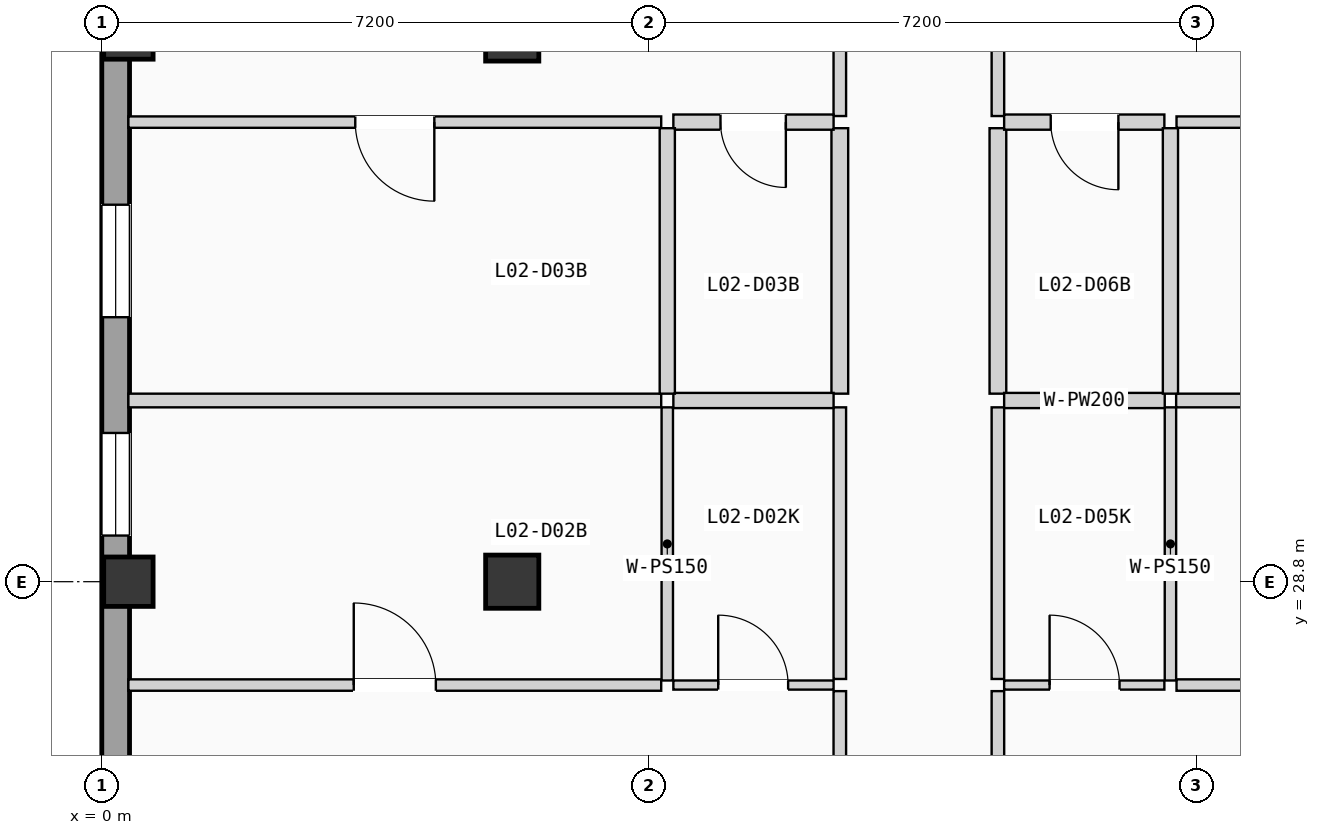
"""IFC4 building model, lengths in metres.
Left out: names, types, materials, properties, quantities, classifications, styles, units other than length and angle.
Written with IfcOpenShell. Run it as: python <this file> out.ifc"""

import sys

from ifc_helpers import new_model, si_unit, direction, frame, frame_2d, origin, origin_2d, place, context, subcontext, project, spatial, rectangle, extrude, element, fill, save


model = new_model("IFC4")
c1 = context("Model", 3, precision=1e-05, world=origin(), true_north=direction((0.0, 1.0)))
c2 = subcontext(c1, "Body", "Model", "MODEL_VIEW")
j1 = project(units=[si_unit("LENGTHUNIT", "METRE"), si_unit("PLANEANGLEUNIT", "RADIAN")], contexts=[c1])
p1 = place(None, origin())
s1 = spatial("IfcSite", under=j1, at=p1, CompositionType="ELEMENT")
p2 = place(p1, origin())
s2 = spatial("IfcBuilding", under=s1, at=p2, CompositionType="ELEMENT")
p3 = place(p2, frame((0.0, 0.0, 8.575)))
s3 = spatial("IfcBuildingStorey", under=s2, at=p3, CompositionType="ELEMENT", Elevation=8.575)
for number, where, z_axis, x_axis in (
    (1, (0.35, 28.8, 0.0), (0.0, 0.0, 1.0), (1.0, 0.0, 0.0)),
    (2, (0.35, 36.0, 0.0), (0.0, 0.0, 1.0), (1.0, 0.0, 0.0)),
):
    element("IfcColumn", number, at=place(p3, frame(where, z_axis=z_axis, x_axis=x_axis)), inside=s3, PredefinedType="COLUMN", context=c2, shape_type="SweptSolid", body=[
        extrude(rectangle(XDim=0.65, YDim=0.65, at=origin_2d()), origin(), (0.0, 0.0, 1.0), 3.5),
    ])
for number, where, z_axis, x_axis in (
    (3, (5.4, 28.8, 0.0), (0.0, 0.0, 1.0), (1.0, 0.0, 0.0)),
    (4, (5.4, 36.0, 0.0), (0.0, 0.0, 1.0), (1.0, 0.0, 0.0)),
):
    element("IfcColumn", number, at=place(p3, frame(where, z_axis=z_axis, x_axis=x_axis)), inside=s3, PredefinedType="COLUMN", context=c2, shape_type="SweptSolid", body=[
        extrude(rectangle(XDim=0.7, YDim=0.7, at=origin_2d()), origin(), (0.0, 0.0, 1.0), 3.5),
    ])
p4 = place(p3, frame((0.183, 0.365, 0.0), z_axis=(0.0, 0.0, 1.0), x_axis=(0.0, 1.0, 0.0)))
e5 = element("IfcWall", 5, at=p4, inside=s3, PredefinedType="SOLIDWALL", context=c2, shape_type="SweptSolid", body=[
    extrude(rectangle(XDim=49.67, YDim=0.365, at=frame_2d((24.835, 0.0))), origin(), (0.0, 0.0, 1.0), 3.24),
])
p5 = place(p4, frame((11.701, 0.0, 0.755)))
e6 = element("IfcOpeningElement", 6, at=p5, cuts=e5, PredefinedType="OPENING", context=c2, shape_type="SweptSolid", body=[
    extrude(rectangle(XDim=1.25, YDim=1.8, at=frame_2d((0.625, 0.9))), frame((0.0, 0.192, 0.0), z_axis=(0.0, -1.0, 0.0), x_axis=(1.0, 0.0, 0.0)), (0.0, 0.0, 1.0), 0.385),
])
p6 = place(p4, frame((8.306, 0.0, 0.9)))
e7 = element("IfcOpeningElement", 7, at=p6, cuts=e5, PredefinedType="OPENING", context=c2, shape_type="SweptSolid", body=[
    extrude(rectangle(XDim=1.35, YDim=1.2, at=frame_2d((0.675, 0.6))), frame((0.0, 0.192, 0.0), z_axis=(0.0, -1.0, 0.0), x_axis=(1.0, 0.0, 0.0)), (0.0, 0.0, 1.0), 0.385),
])
p7 = place(p4, frame((16.34, 0.0, 0.9)))
e8 = element("IfcOpeningElement", 8, at=p7, cuts=e5, PredefinedType="OPENING", context=c2, shape_type="SweptSolid", body=[
    extrude(rectangle(XDim=1.35, YDim=1.35, at=frame_2d((0.675, 0.675))), frame((0.0, 0.192, 0.0), z_axis=(0.0, -1.0, 0.0), x_axis=(1.0, 0.0, 0.0)), (0.0, 0.0, 1.0), 0.385),
])
p8 = place(p4, frame((24.16, 0.0, 0.9)))
e9 = element("IfcOpeningElement", 9, at=p8, cuts=e5, PredefinedType="OPENING", context=c2, shape_type="SweptSolid", body=[
    extrude(rectangle(XDim=1.35, YDim=1.5, at=frame_2d((0.675, 0.75))), frame((0.0, 0.192, 0.0), z_axis=(0.0, -1.0, 0.0), x_axis=(1.0, 0.0, 0.0)), (0.0, 0.0, 1.0), 0.385),
])
p9 = place(p4, frame((19.278, 0.0, 0.9)))
e10 = element("IfcOpeningElement", 10, at=p9, cuts=e5, PredefinedType="OPENING", context=c2, shape_type="SweptSolid", body=[
    extrude(rectangle(XDim=1.35, YDim=1.65, at=frame_2d((0.675, 0.825))), frame((0.0, 0.192, 0.0), z_axis=(0.0, -1.0, 0.0), x_axis=(1.0, 0.0, 0.0)), (0.0, 0.0, 1.0), 0.385),
])
p10 = place(p4, frame((29.042, 0.0, 0.755)))
e11 = element("IfcOpeningElement", 11, at=p10, cuts=e5, PredefinedType="OPENING", context=c2, shape_type="SweptSolid", body=[
    extrude(rectangle(XDim=1.35, YDim=1.8, at=frame_2d((0.675, 0.9))), frame((0.0, 0.192, 0.0), z_axis=(0.0, -1.0, 0.0), x_axis=(1.0, 0.0, 0.0)), (0.0, 0.0, 1.0), 0.385),
])
p11 = place(p4, frame((36.603, 0.0, 0.9)))
e12 = element("IfcOpeningElement", 12, at=p11, cuts=e5, PredefinedType="OPENING", context=c2, shape_type="SweptSolid", body=[
    extrude(rectangle(XDim=1.48, YDim=1.2, at=frame_2d((0.74, 0.6))), frame((0.0, 0.192, 0.0), z_axis=(0.0, -1.0, 0.0), x_axis=(1.0, 0.0, 0.0)), (0.0, 0.0, 1.0), 0.385),
])
p12 = place(p4, frame((31.915, 0.0, 0.9)))
e13 = element("IfcOpeningElement", 13, at=p12, cuts=e5, PredefinedType="OPENING", context=c2, shape_type="SweptSolid", body=[
    extrude(rectangle(XDim=1.48, YDim=1.35, at=frame_2d((0.74, 0.675))), frame((0.0, 0.192, 0.0), z_axis=(0.0, -1.0, 0.0), x_axis=(1.0, 0.0, 0.0)), (0.0, 0.0, 1.0), 0.385),
])
p13 = place(p4, frame((39.948, 0.0, 0.9)))
e14 = element("IfcOpeningElement", 14, at=p13, cuts=e5, PredefinedType="OPENING", context=c2, shape_type="SweptSolid", body=[
    extrude(rectangle(XDim=1.48, YDim=1.5, at=frame_2d((0.74, 0.75))), frame((0.0, 0.192, 0.0), z_axis=(0.0, -1.0, 0.0), x_axis=(1.0, 0.0, 0.0)), (0.0, 0.0, 1.0), 0.385),
])
p14 = place(p3, frame((9.71, 23.04, 0.0), z_axis=(0.0, 0.0, 1.0), x_axis=(0.0, 1.0, 0.0)))
e15 = element("IfcWall", 15, at=p14, inside=s3, PredefinedType="PARTITIONING", context=c2, shape_type="SweptSolid", body=[
    extrude(rectangle(XDim=4.32, YDim=0.165, at=frame_2d((2.16, 0.0))), origin(), (0.0, 0.0, 1.0), 3.22),
])
p15 = place(p14, frame((1.635, 0.0, 0.0)))
e16 = element("IfcOpeningElement", 16, at=p15, cuts=e15, PredefinedType="OPENING", context=c2, shape_type="SweptSolid", body=[
    extrude(rectangle(XDim=1.05, YDim=2.13, at=frame_2d((0.525, 1.065))), frame((0.0, 0.093, 0.0), z_axis=(0.0, -1.0, 0.0), x_axis=(1.0, 0.0, 0.0)), (0.0, 0.0, 1.0), 0.185),
])
p16 = place(p3, frame((9.71, 27.52, 0.0), z_axis=(0.0, 0.0, 1.0), x_axis=(0.0, 1.0, 0.0)))
e17 = element("IfcWall", 17, at=p16, inside=s3, PredefinedType="PARTITIONING", context=c2, shape_type="SweptSolid", body=[
    extrude(rectangle(XDim=3.574, YDim=0.165, at=frame_2d((1.787, 0.0))), origin(), (0.0, 0.0, 1.0), 3.22),
])
p17 = place(p3, frame((9.71, 34.927, 0.0), z_axis=(0.0, 0.0, 1.0), x_axis=(0.0, 1.0, 0.0)))
e18 = element("IfcWall", 18, at=p17, inside=s3, PredefinedType="PARTITIONING", context=c2, shape_type="SweptSolid", body=[
    extrude(rectangle(XDim=4.22, YDim=0.165, at=frame_2d((2.11, 0.0))), origin(), (0.0, 0.0, 1.0), 3.22),
])
p18 = place(p17, frame((1.585, 0.0, 0.0)))
e19 = element("IfcOpeningElement", 19, at=p18, cuts=e18, PredefinedType="OPENING", context=c2, shape_type="SweptSolid", body=[
    extrude(rectangle(XDim=1.05, YDim=2.13, at=frame_2d((0.525, 1.065))), frame((0.0, 0.093, 0.0), z_axis=(0.0, -1.0, 0.0), x_axis=(1.0, 0.0, 0.0)), (0.0, 0.0, 1.0), 0.185),
])
p19 = place(p3, frame((9.71, 31.274, 0.0), z_axis=(0.0, 0.0, 1.0), x_axis=(0.0, 1.0, 0.0)))
e20 = element("IfcWall", 20, at=p19, inside=s3, PredefinedType="PLUMBINGWALL", context=c2, shape_type="SweptSolid", body=[
    extrude(rectangle(XDim=3.493, YDim=0.22, at=frame_2d((1.747, 0.0))), origin(), (0.0, 0.0, 1.0), 3.22),
])
p20 = place(p3, frame((11.79, 23.04, 0.0), z_axis=(0.0, 0.0, 1.0), x_axis=(0.0, 1.0, 0.0)))
e21 = element("IfcWall", 21, at=p20, inside=s3, PredefinedType="PARTITIONING", context=c2, shape_type="SweptSolid", body=[
    extrude(rectangle(XDim=4.32, YDim=0.165, at=frame_2d((2.16, 0.0))), origin(), (0.0, 0.0, 1.0), 3.22),
])
p21 = place(p20, frame((1.635, 0.0, 0.0)))
e22 = element("IfcOpeningElement", 22, at=p21, cuts=e21, PredefinedType="OPENING", context=c2, shape_type="SweptSolid", body=[
    extrude(rectangle(XDim=1.05, YDim=2.13, at=frame_2d((0.525, 1.065))), frame((0.0, 0.093, 0.0), z_axis=(0.0, -1.0, 0.0), x_axis=(1.0, 0.0, 0.0)), (0.0, 0.0, 1.0), 0.185),
])
p22 = place(p3, frame((11.79, 27.52, 0.0), z_axis=(0.0, 0.0, 1.0), x_axis=(0.0, 1.0, 0.0)))
e23 = element("IfcWall", 23, at=p22, inside=s3, PredefinedType="PARTITIONING", context=c2, shape_type="SweptSolid", body=[
    extrude(rectangle(XDim=3.574, YDim=0.165, at=frame_2d((1.787, 0.0))), origin(), (0.0, 0.0, 1.0), 3.22),
])
p23 = place(p3, frame((11.79, 34.927, 0.0), z_axis=(0.0, 0.0, 1.0), x_axis=(0.0, 1.0, 0.0)))
e24 = element("IfcWall", 24, at=p23, inside=s3, PredefinedType="PARTITIONING", context=c2, shape_type="SweptSolid", body=[
    extrude(rectangle(XDim=4.22, YDim=0.165, at=frame_2d((2.11, 0.0))), origin(), (0.0, 0.0, 1.0), 3.22),
])
p24 = place(p23, frame((1.585, 0.0, 0.0)))
e25 = element("IfcOpeningElement", 25, at=p24, cuts=e24, PredefinedType="OPENING", context=c2, shape_type="SweptSolid", body=[
    extrude(rectangle(XDim=1.05, YDim=2.13, at=frame_2d((0.525, 1.065))), frame((0.0, 0.093, 0.0), z_axis=(0.0, -1.0, 0.0), x_axis=(1.0, 0.0, 0.0)), (0.0, 0.0, 1.0), 0.185),
])
p25 = place(p3, frame((11.79, 31.274, 0.0), z_axis=(0.0, 0.0, 1.0), x_axis=(0.0, 1.0, 0.0)))
e26 = element("IfcWall", 26, at=p25, inside=s3, PredefinedType="PLUMBINGWALL", context=c2, shape_type="SweptSolid", body=[
    extrude(rectangle(XDim=3.493, YDim=0.22, at=frame_2d((1.747, 0.0))), origin(), (0.0, 0.0, 1.0), 3.22),
])
p26 = place(p3, frame((7.52, 27.44, 0.0), z_axis=(0.0, 0.0, 1.0), x_axis=(1.0, 0.0, 0.0)))
e27 = element("IfcWall", 27, at=p26, inside=s3, PredefinedType="PARTITIONING", context=c2, shape_type="SweptSolid", body=[
    extrude(rectangle(XDim=2.108, YDim=0.12, at=frame_2d((1.054, 0.0))), origin(), (0.0, 0.0, 1.0), 3.22),
])
p27 = place(p26, frame((0.59, 0.0, 0.0)))
e28 = element("IfcOpeningElement", 28, at=p27, cuts=e27, PredefinedType="OPENING", context=c2, shape_type="SweptSolid", body=[
    extrude(rectangle(XDim=0.92, YDim=2.02, at=frame_2d((0.46, 1.01))), frame((0.0, 0.07, 0.0), z_axis=(0.0, -1.0, 0.0), x_axis=(1.0, 0.0, 0.0)), (0.0, 0.0, 1.0), 0.14),
])
p28 = place(p3, frame((0.35, 27.44, 0.0), z_axis=(0.0, 0.0, 1.0), x_axis=(1.0, 0.0, 0.0)))
e29 = element("IfcWall", 29, at=p28, inside=s3, PredefinedType="PARTITIONING", context=c2, shape_type="SweptSolid", body=[
    extrude(rectangle(XDim=7.01, YDim=0.15, at=frame_2d((3.505, 0.0))), origin(), (0.0, 0.0, 1.0), 3.22),
])
p29 = place(p28, frame((2.965, 0.0, 0.0)))
e30 = element("IfcOpeningElement", 30, at=p29, cuts=e29, PredefinedType="OPENING", context=c2, shape_type="SweptSolid", body=[
    extrude(rectangle(XDim=1.08, YDim=2.1, at=frame_2d((0.54, 1.05))), frame((0.0, 0.085, 0.0), z_axis=(0.0, -1.0, 0.0), x_axis=(1.0, 0.0, 0.0)), (0.0, 0.0, 1.0), 0.17),
])
p30 = place(p3, frame((7.44, 27.5, 0.0), z_axis=(0.0, 0.0, 1.0), x_axis=(0.0, 1.0, 0.0)))
e31 = element("IfcWall", 31, at=p30, inside=s3, PredefinedType="PARTITIONING", context=c2, shape_type="SweptSolid", body=[
    extrude(rectangle(XDim=3.594, YDim=0.15, at=frame_2d((1.797, 0.0))), origin(), (0.0, 0.0, 1.0), 3.22),
])
p31 = place(p3, frame((7.52, 31.184, 0.0), z_axis=(0.0, 0.0, 1.0), x_axis=(1.0, 0.0, 0.0)))
e32 = element("IfcWall", 32, at=p31, inside=s3, PredefinedType="PLUMBINGWALL", context=c2, shape_type="SweptSolid", body=[
    extrude(rectangle(XDim=2.108, YDim=0.2, at=frame_2d((1.054, 0.0))), origin(), (0.0, 0.0, 1.0), 3.22),
])
p32 = place(p3, frame((0.35, 31.184, 0.0), z_axis=(0.0, 0.0, 1.0), x_axis=(1.0, 0.0, 0.0)))
e33 = element("IfcWall", 33, at=p32, inside=s3, PredefinedType="PARTITIONING", context=c2, shape_type="SweptSolid", body=[
    extrude(rectangle(XDim=7.01, YDim=0.18, at=frame_2d((3.505, 0.0))), origin(), (0.0, 0.0, 1.0), 3.22),
])
p33 = place(p3, frame((7.52, 34.847, 0.0), z_axis=(0.0, 0.0, 1.0), x_axis=(1.0, 0.0, 0.0)))
e34 = element("IfcWall", 34, at=p33, inside=s3, PredefinedType="PLUMBINGWALL", context=c2, shape_type="SweptSolid", body=[
    extrude(rectangle(XDim=2.108, YDim=0.2, at=frame_2d((1.054, 0.0))), origin(), (0.0, 0.0, 1.0), 3.22),
])
p34 = place(p33, frame((0.62, 0.0, 0.0)))
e35 = element("IfcOpeningElement", 35, at=p34, cuts=e34, PredefinedType="OPENING", context=c2, shape_type="SweptSolid", body=[
    extrude(rectangle(XDim=0.86, YDim=2.0, at=frame_2d((0.43, 1.0))), frame((0.0, 0.11, 0.0), z_axis=(0.0, -1.0, 0.0), x_axis=(1.0, 0.0, 0.0)), (0.0, 0.0, 1.0), 0.22),
])
p35 = place(p3, frame((0.35, 34.847, 0.0), z_axis=(0.0, 0.0, 1.0), x_axis=(1.0, 0.0, 0.0)))
e36 = element("IfcWall", 36, at=p35, inside=s3, PredefinedType="PARTITIONING", context=c2, shape_type="SweptSolid", body=[
    extrude(rectangle(XDim=7.01, YDim=0.15, at=frame_2d((3.505, 0.0))), origin(), (0.0, 0.0, 1.0), 3.22),
])
p36 = place(p35, frame((2.985, 0.0, 0.0)))
e37 = element("IfcOpeningElement", 37, at=p36, cuts=e36, PredefinedType="OPENING", context=c2, shape_type="SweptSolid", body=[
    extrude(rectangle(XDim=1.04, YDim=2.08, at=frame_2d((0.52, 1.04))), frame((0.0, 0.085, 0.0), z_axis=(0.0, -1.0, 0.0), x_axis=(1.0, 0.0, 0.0)), (0.0, 0.0, 1.0), 0.17),
])
p37 = place(p3, frame((7.44, 31.274, 0.0), z_axis=(0.0, 0.0, 1.0), x_axis=(0.0, 1.0, 0.0)))
e38 = element("IfcWall", 38, at=p37, inside=s3, PredefinedType="PLUMBINGWALL", context=c2, shape_type="SweptSolid", body=[
    extrude(rectangle(XDim=3.493, YDim=0.2, at=frame_2d((1.747, 0.0))), origin(), (0.0, 0.0, 1.0), 3.22),
])
p38 = place(p3, frame((11.872, 27.44, 0.0), z_axis=(0.0, 0.0, 1.0), x_axis=(1.0, 0.0, 0.0)))
e39 = element("IfcWall", 39, at=p38, inside=s3, PredefinedType="PARTITIONING", context=c2, shape_type="SweptSolid", body=[
    extrude(rectangle(XDim=2.108, YDim=0.12, at=frame_2d((1.054, 0.0))), origin(), (0.0, 0.0, 1.0), 3.22),
])
p39 = place(p38, frame((0.598, 0.0, 0.0)))
e40 = element("IfcOpeningElement", 40, at=p39, cuts=e39, PredefinedType="OPENING", context=c2, shape_type="SweptSolid", body=[
    extrude(rectangle(XDim=0.92, YDim=2.02, at=frame_2d((0.46, 1.01))), frame((0.0, 0.07, 0.0), z_axis=(0.0, -1.0, 0.0), x_axis=(1.0, 0.0, 0.0)), (0.0, 0.0, 1.0), 0.14),
])
p40 = place(p3, frame((14.14, 27.44, 0.0), z_axis=(0.0, 0.0, 1.0), x_axis=(1.0, 0.0, 0.0)))
e41 = element("IfcWall", 41, at=p40, inside=s3, PredefinedType="PARTITIONING", context=c2, shape_type="SweptSolid", body=[
    extrude(rectangle(XDim=7.11, YDim=0.15, at=frame_2d((3.555, 0.0))), origin(), (0.0, 0.0, 1.0), 3.22),
])
p41 = place(p40, frame((3.015, 0.0, 0.0)))
e42 = element("IfcOpeningElement", 42, at=p41, cuts=e41, PredefinedType="OPENING", context=c2, shape_type="SweptSolid", body=[
    extrude(rectangle(XDim=1.08, YDim=2.1, at=frame_2d((0.54, 1.05))), frame((0.0, 0.085, 0.0), z_axis=(0.0, -1.0, 0.0), x_axis=(1.0, 0.0, 0.0)), (0.0, 0.0, 1.0), 0.17),
])
p42 = place(p3, frame((14.06, 27.5, 0.0), z_axis=(0.0, 0.0, 1.0), x_axis=(0.0, 1.0, 0.0)))
e43 = element("IfcWall", 43, at=p42, inside=s3, PredefinedType="PARTITIONING", context=c2, shape_type="SweptSolid", body=[
    extrude(rectangle(XDim=3.594, YDim=0.15, at=frame_2d((1.797, 0.0))), origin(), (0.0, 0.0, 1.0), 3.22),
])
p43 = place(p3, frame((11.872, 31.184, 0.0), z_axis=(0.0, 0.0, 1.0), x_axis=(1.0, 0.0, 0.0)))
e44 = element("IfcWall", 44, at=p43, inside=s3, PredefinedType="PLUMBINGWALL", context=c2, shape_type="SweptSolid", body=[
    extrude(rectangle(XDim=2.113, YDim=0.2, at=frame_2d((1.057, 0.0))), origin(), (0.0, 0.0, 1.0), 3.22),
])
p44 = place(p3, frame((14.135, 31.184, 0.0), z_axis=(0.0, 0.0, 1.0), x_axis=(1.0, 0.0, 0.0)))
e45 = element("IfcWall", 45, at=p44, inside=s3, PredefinedType="PARTITIONING", context=c2, shape_type="SweptSolid", body=[
    extrude(rectangle(XDim=7.115, YDim=0.18, at=frame_2d((3.558, 0.0))), origin(), (0.0, 0.0, 1.0), 3.22),
])
p45 = place(p3, frame((11.872, 34.847, 0.0), z_axis=(0.0, 0.0, 1.0), x_axis=(1.0, 0.0, 0.0)))
e46 = element("IfcWall", 46, at=p45, inside=s3, PredefinedType="PLUMBINGWALL", context=c2, shape_type="SweptSolid", body=[
    extrude(rectangle(XDim=2.108, YDim=0.2, at=frame_2d((1.054, 0.0))), origin(), (0.0, 0.0, 1.0), 3.22),
])
p46 = place(p45, frame((0.613, 0.0, 0.0)))
e47 = element("IfcOpeningElement", 47, at=p46, cuts=e46, PredefinedType="OPENING", context=c2, shape_type="SweptSolid", body=[
    extrude(rectangle(XDim=0.89, YDim=2.03, at=frame_2d((0.445, 1.015))), frame((0.0, 0.11, 0.0), z_axis=(0.0, -1.0, 0.0), x_axis=(1.0, 0.0, 0.0)), (0.0, 0.0, 1.0), 0.22),
])
p47 = place(p3, frame((14.14, 34.847, 0.0), z_axis=(0.0, 0.0, 1.0), x_axis=(1.0, 0.0, 0.0)))
e48 = element("IfcWall", 48, at=p47, inside=s3, PredefinedType="PARTITIONING", context=c2, shape_type="SweptSolid", body=[
    extrude(rectangle(XDim=7.11, YDim=0.15, at=frame_2d((3.555, 0.0))), origin(), (0.0, 0.0, 1.0), 3.22),
])
p48 = place(p47, frame((3.035, 0.0, 0.0)))
e49 = element("IfcOpeningElement", 49, at=p48, cuts=e48, PredefinedType="OPENING", context=c2, shape_type="SweptSolid", body=[
    extrude(rectangle(XDim=1.04, YDim=2.08, at=frame_2d((0.52, 1.04))), frame((0.0, 0.085, 0.0), z_axis=(0.0, -1.0, 0.0), x_axis=(1.0, 0.0, 0.0)), (0.0, 0.0, 1.0), 0.17),
])
p49 = place(p3, frame((14.06, 31.274, 0.0), z_axis=(0.0, 0.0, 1.0), x_axis=(0.0, 1.0, 0.0)))
e50 = element("IfcWall", 50, at=p49, inside=s3, PredefinedType="PLUMBINGWALL", context=c2, shape_type="SweptSolid", body=[
    extrude(rectangle(XDim=3.493, YDim=0.2, at=frame_2d((1.747, 0.0))), origin(), (0.0, 0.0, 1.0), 3.22),
])
p50 = place(p10, origin())
e51 = element("IfcWindow", 51, at=p50, inside=s3, PartitioningType="SINGLE_PANEL", PredefinedType="WINDOW", context=c2, shape_type="SweptSolid", body=[
    extrude(rectangle(XDim=1.35, YDim=1.8, at=frame_2d((0.675, 0.9))), frame((0.0, 0.03, 0.0), z_axis=(0.0, -1.0, 0.0), x_axis=(1.0, 0.0, 0.0)), (0.0, 0.0, 1.0), 0.06),
])
fill(e11, e51)
p51 = place(p12, origin())
e52 = element("IfcWindow", 52, at=p51, inside=s3, PartitioningType="SINGLE_PANEL", PredefinedType="WINDOW", context=c2, shape_type="SweptSolid", body=[
    extrude(rectangle(XDim=1.48, YDim=1.35, at=frame_2d((0.74, 0.675))), frame((0.0, 0.03, 0.0), z_axis=(0.0, -1.0, 0.0), x_axis=(1.0, 0.0, 0.0)), (0.0, 0.0, 1.0), 0.06),
])
fill(e13, e52)
p52 = place(p27, origin())
e53 = element("IfcDoor", 53, at=p52, inside=s3, OperationType="SINGLE_SWING_LEFT", PredefinedType="DOOR", context=c2, shape_type="SweptSolid", body=[
    extrude(rectangle(XDim=0.92, YDim=2.02, at=frame_2d((0.46, 1.01))), frame((0.0, 0.025, 0.0), z_axis=(0.0, -1.0, 0.0), x_axis=(1.0, 0.0, 0.0)), (0.0, 0.0, 1.0), 0.05),
])
fill(e28, e53)
p53 = place(p29, origin())
e54 = element("IfcDoor", 54, at=p53, inside=s3, OperationType="SINGLE_SWING_LEFT", PredefinedType="DOOR", context=c2, shape_type="SweptSolid", body=[
    extrude(rectangle(XDim=1.08, YDim=2.1, at=frame_2d((0.54, 1.05))), frame((0.0, 0.025, 0.0), z_axis=(0.0, -1.0, 0.0), x_axis=(1.0, 0.0, 0.0)), (0.0, 0.0, 1.0), 0.05),
])
fill(e30, e54)
p54 = place(p34, frame((0.86, 0.0, 0.0), z_axis=(0.0, 0.0, 1.0), x_axis=(-1.0, 0.0, 0.0)))
e55 = element("IfcDoor", 55, at=p54, inside=s3, OperationType="SINGLE_SWING_RIGHT", PredefinedType="DOOR", context=c2, shape_type="SweptSolid", body=[
    extrude(rectangle(XDim=0.86, YDim=2.0, at=frame_2d((0.43, 1.0))), frame((0.0, 0.025, 0.0), z_axis=(0.0, -1.0, 0.0), x_axis=(1.0, 0.0, 0.0)), (0.0, 0.0, 1.0), 0.05),
])
fill(e35, e55)
p55 = place(p36, frame((1.04, 0.0, 0.0), z_axis=(0.0, 0.0, 1.0), x_axis=(-1.0, 0.0, 0.0)))
e56 = element("IfcDoor", 56, at=p55, inside=s3, OperationType="SINGLE_SWING_RIGHT", PredefinedType="DOOR", context=c2, shape_type="SweptSolid", body=[
    extrude(rectangle(XDim=1.04, YDim=2.08, at=frame_2d((0.52, 1.04))), frame((0.0, 0.025, 0.0), z_axis=(0.0, -1.0, 0.0), x_axis=(1.0, 0.0, 0.0)), (0.0, 0.0, 1.0), 0.05),
])
fill(e37, e56)
p56 = place(p39, origin())
e57 = element("IfcDoor", 57, at=p56, inside=s3, OperationType="SINGLE_SWING_LEFT", PredefinedType="DOOR", context=c2, shape_type="SweptSolid", body=[
    extrude(rectangle(XDim=0.92, YDim=2.02, at=frame_2d((0.46, 1.01))), frame((0.0, 0.025, 0.0), z_axis=(0.0, -1.0, 0.0), x_axis=(1.0, 0.0, 0.0)), (0.0, 0.0, 1.0), 0.05),
])
fill(e40, e57)
p57 = place(p46, frame((0.89, 0.0, 0.0), z_axis=(0.0, 0.0, 1.0), x_axis=(-1.0, 0.0, 0.0)))
e58 = element("IfcDoor", 58, at=p57, inside=s3, OperationType="SINGLE_SWING_RIGHT", PredefinedType="DOOR", context=c2, shape_type="SweptSolid", body=[
    extrude(rectangle(XDim=0.89, YDim=2.03, at=frame_2d((0.445, 1.015))), frame((0.0, 0.025, 0.0), z_axis=(0.0, -1.0, 0.0), x_axis=(1.0, 0.0, 0.0)), (0.0, 0.0, 1.0), 0.05),
])
fill(e47, e58)
save(model, sys.argv[1])
